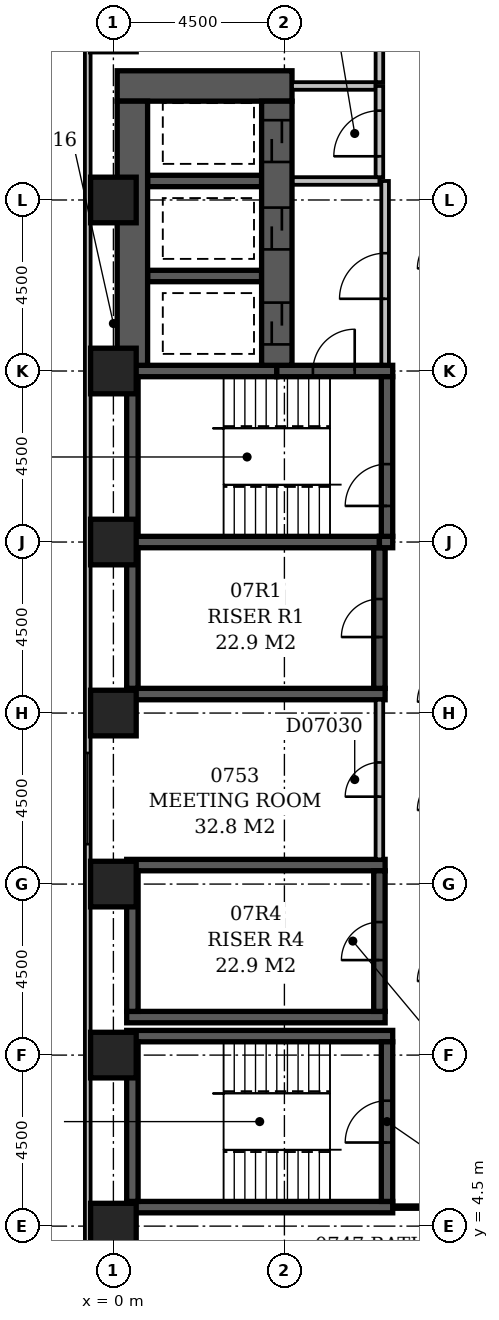
"""IFC4 building model, lengths in metres.
Left out: names, types, materials, properties, quantities, classifications, styles, units other than length and angle.
Written with IfcOpenShell. Run it as: python <this file> out.ifc"""

import sys

from ifc_helpers import new_model, si_unit, direction, frame, frame_2d, origin, origin_2d, place, context, subcontext, project, spatial, rectangle, extrude, element, fill, save


model = new_model("IFC4")
c1 = context("Model", 3, precision=1e-05, world=origin(), true_north=direction((0.0, 1.0)))
c2 = subcontext(c1, "Body", "Model", "MODEL_VIEW")
j1 = project(units=[si_unit("LENGTHUNIT", "METRE"), si_unit("PLANEANGLEUNIT", "RADIAN")], contexts=[c1])
p1 = place(None, origin())
s1 = spatial("IfcSite", under=j1, at=p1, CompositionType="ELEMENT")
p2 = place(p1, origin())
s2 = spatial("IfcBuilding", under=s1, at=p2, CompositionType="ELEMENT")
p3 = place(p2, frame((0.0, 0.0, 36.2)))
s3 = spatial("IfcBuildingStorey", under=s2, at=p3, CompositionType="ELEMENT", Elevation=36.2)
p4 = place(p3, frame((0.1, 34.5, -0.3), z_axis=(0.0, 0.0, 1.0), x_axis=(1.0, 0.0, 0.0)))
e1 = element("IfcWall", 1, at=p4, inside=s3, PredefinedType="SHEAR", context=c2, shape_type="SweptSolid", body=[
    extrude(rectangle(XDim=4.6, YDim=0.8, at=frame_2d((2.3, 0.0))), origin(), (0.0, 0.0, 1.0), 3.6),
])
for number, where, z_axis, x_axis in (
    (2, (0.35, 5.0, -0.3), (0.0, 0.0, 1.0), (1.0, 0.0, 0.0)),
    (3, (0.35, 9.5, -0.3), (0.0, 0.0, 1.0), (1.0, 0.0, 0.0)),
):
    element("IfcWall", number, at=place(p3, frame(where, z_axis=z_axis, x_axis=x_axis)), inside=s3, PredefinedType="SHEAR", context=c2, shape_type="SweptSolid", body=[
        extrude(rectangle(XDim=7.0, YDim=0.3, at=frame_2d((3.5, 0.0))), origin(), (0.0, 0.0, 1.0), 3.6),
    ])
for number, where, z_axis, x_axis in (
    (4, (0.35, 10.0, -0.3), (0.0, 0.0, 1.0), (1.0, 0.0, 0.0)),
    (5, (0.35, 14.0, -0.3), (0.0, 0.0, 1.0), (1.0, 0.0, 0.0)),
    (6, (0.35, 18.5, -0.3), (0.0, 0.0, 1.0), (1.0, 0.0, 0.0)),
):
    element("IfcWall", number, at=place(p3, frame(where, z_axis=z_axis, x_axis=x_axis)), inside=s3, PredefinedType="SHEAR", context=c2, shape_type="SweptSolid", body=[
        extrude(rectangle(XDim=6.8, YDim=0.3, at=frame_2d((3.4, 0.0))), origin(), (0.0, 0.0, 1.0), 3.6),
    ])
p5 = place(p3, frame((0.35, 22.5, -0.3), z_axis=(0.0, 0.0, 1.0), x_axis=(1.0, 0.0, 0.0)))
e7 = element("IfcWall", 7, at=p5, inside=s3, PredefinedType="SHEAR", context=c2, shape_type="SweptSolid", body=[
    extrude(rectangle(XDim=6.65, YDim=0.3, at=frame_2d((3.325, 0.0))), origin(), (0.0, 0.0, 1.0), 3.6),
])
p6 = place(p3, frame((0.35, 27.0, -0.3), z_axis=(0.0, 0.0, 1.0), x_axis=(1.0, 0.0, 0.0)))
e8 = element("IfcWall", 8, at=p6, inside=s3, PredefinedType="SHEAR", context=c2, shape_type="SweptSolid", body=[
    extrude(rectangle(XDim=3.95, YDim=0.3, at=frame_2d((1.975, 0.0))), origin(), (0.0, 0.0, 1.0), 3.6),
])
p7 = place(p3, frame((0.5, 5.15, -0.3), z_axis=(0.0, 0.0, 1.0), x_axis=(0.0, 1.0, 0.0)))
e9 = element("IfcWall", 9, at=p7, inside=s3, PredefinedType="SHEAR", context=c2, shape_type="SweptSolid", body=[
    extrude(rectangle(XDim=4.2, YDim=0.3, at=frame_2d((2.1, 0.0))), origin(), (0.0, 0.0, 1.0), 3.6),
])
for number, where, z_axis, x_axis in (
    (10, (0.5, 10.15, -0.3), (0.0, 0.0, 1.0), (0.0, 1.0, 0.0)),
    (11, (0.5, 18.65, -0.3), (0.0, 0.0, 1.0), (0.0, 1.0, 0.0)),
):
    element("IfcWall", number, at=place(p3, frame(where, z_axis=z_axis, x_axis=x_axis)), inside=s3, PredefinedType="SHEAR", context=c2, shape_type="SweptSolid", body=[
        extrude(rectangle(XDim=3.7, YDim=0.3, at=frame_2d((1.85, 0.0))), origin(), (0.0, 0.0, 1.0), 3.6),
    ])
p8 = place(p3, frame((0.5, 22.65, -0.3), z_axis=(0.0, 0.0, 1.0), x_axis=(0.0, 1.0, 0.0)))
e12 = element("IfcWall", 12, at=p8, inside=s3, PredefinedType="SHEAR", context=c2, shape_type="SweptSolid", body=[
    extrude(rectangle(XDim=4.2, YDim=0.3, at=frame_2d((2.1, 0.0))), origin(), (0.0, 0.0, 1.0), 3.6),
])
p9 = place(p3, frame((0.5, 27.15, -0.3), z_axis=(0.0, 0.0, 1.0), x_axis=(0.0, 1.0, 0.0)))
e13 = element("IfcWall", 13, at=p9, inside=s3, PredefinedType="SHEAR", context=c2, shape_type="SweptSolid", body=[
    extrude(rectangle(XDim=6.95, YDim=0.8, at=frame_2d((3.475, 0.0))), origin(), (0.0, 0.0, 1.0), 3.6),
])
for number, where, z_axis, x_axis in (
    (14, (0.9, 29.5, -0.3), (0.0, 0.0, 1.0), (1.0, 0.0, 0.0)),
    (15, (0.9, 32.0, -0.3), (0.0, 0.0, 1.0), (1.0, 0.0, 0.0)),
):
    element("IfcWall", number, at=place(p3, frame(where, z_axis=z_axis, x_axis=x_axis)), inside=s3, PredefinedType="SHEAR", context=c2, shape_type="SweptSolid", body=[
        extrude(rectangle(XDim=3.0, YDim=0.3, at=frame_2d((1.5, 0.0))), origin(), (0.0, 0.0, 1.0), 3.6),
    ])
p10 = place(p3, frame((4.3, 27.0, -0.3), z_axis=(0.0, 0.0, 1.0), x_axis=(1.0, 0.0, 0.0)))
e16 = element("IfcWall", 16, at=p10, inside=s3, PredefinedType="SHEAR", context=c2, shape_type="SweptSolid", body=[
    extrude(rectangle(XDim=3.05, YDim=0.3, at=frame_2d((1.525, 0.0))), origin(), (0.0, 0.0, 1.0), 3.6),
])
p11 = place(p10, frame((0.95, 0.0, 0.3)))
e17 = element("IfcOpeningElement", 17, at=p11, cuts=e16, PredefinedType="OPENING", context=c2, shape_type="SweptSolid", body=[
    extrude(rectangle(XDim=1.1, YDim=2.1, at=frame_2d((0.55, 1.05))), frame((0.0, 0.162, 0.0), z_axis=(0.0, -1.0, 0.0), x_axis=(1.0, 0.0, 0.0)), (0.0, 0.0, 1.0), 0.324),
])
p12 = place(p3, frame((4.3, 27.15, -0.3), z_axis=(0.0, 0.0, 1.0), x_axis=(0.0, 1.0, 0.0)))
e18 = element("IfcWall", 18, at=p12, inside=s3, PredefinedType="SHEAR", context=c2, shape_type="SweptSolid", body=[
    extrude(rectangle(XDim=6.95, YDim=0.8, at=frame_2d((3.475, 0.0))), origin(), (0.0, 0.0, 1.0), 3.6),
])
p13 = place(p12, frame((3.05, 0.0, 0.3)))
e19 = element("IfcOpeningElement", 19, at=p13, cuts=e18, PredefinedType="OPENING", context=c2, shape_type="SweptSolid", body=[
    extrude(rectangle(XDim=1.1, YDim=2.1, at=frame_2d((0.55, 1.05))), frame((0.0, 0.412, 0.0), z_axis=(0.0, -1.0, 0.0), x_axis=(1.0, 0.0, 0.0)), (0.0, 0.0, 1.0), 0.824),
])
p14 = place(p12, frame((0.55, 0.0, 0.3)))
e20 = element("IfcOpeningElement", 20, at=p14, cuts=e18, PredefinedType="OPENING", context=c2, shape_type="SweptSolid", body=[
    extrude(rectangle(XDim=1.1, YDim=2.1, at=frame_2d((0.55, 1.05))), frame((0.0, 0.412, 0.0), z_axis=(0.0, -1.0, 0.0), x_axis=(1.0, 0.0, 0.0)), (0.0, 0.0, 1.0), 0.824),
])
p15 = place(p12, frame((5.35, 0.0, 0.3)))
e21 = element("IfcOpeningElement", 21, at=p15, cuts=e18, PredefinedType="OPENING", context=c2, shape_type="SweptSolid", body=[
    extrude(rectangle(XDim=1.1, YDim=2.1, at=frame_2d((0.55, 1.05))), frame((0.0, 0.412, 0.0), z_axis=(0.0, -1.0, 0.0), x_axis=(1.0, 0.0, 0.0)), (0.0, 0.0, 1.0), 0.824),
])
p16 = place(p3, frame((7.0, 10.15, -0.3), z_axis=(0.0, 0.0, 1.0), x_axis=(0.0, 1.0, 0.0)))
e22 = element("IfcWall", 22, at=p16, inside=s3, PredefinedType="SHEAR", context=c2, shape_type="SweptSolid", body=[
    extrude(rectangle(XDim=3.7, YDim=0.3, at=frame_2d((1.85, 0.0))), origin(), (0.0, 0.0, 1.0), 3.6),
])
p17 = place(p16, frame((1.35, 0.0, 0.3)))
e23 = element("IfcOpeningElement", 23, at=p17, cuts=e22, PredefinedType="OPENING", context=c2, shape_type="SweptSolid", body=[
    extrude(rectangle(XDim=1.0, YDim=2.1, at=frame_2d((0.5, 1.05))), frame((0.0, 0.162, 0.0), z_axis=(0.0, -1.0, 0.0), x_axis=(1.0, 0.0, 0.0)), (0.0, 0.0, 1.0), 0.324),
])
p18 = place(p3, frame((7.0, 18.65, -0.3), z_axis=(0.0, 0.0, 1.0), x_axis=(0.0, 1.0, 0.0)))
e24 = element("IfcWall", 24, at=p18, inside=s3, PredefinedType="SHEAR", context=c2, shape_type="SweptSolid", body=[
    extrude(rectangle(XDim=3.7, YDim=0.3, at=frame_2d((1.85, 0.0))), origin(), (0.0, 0.0, 1.0), 3.6),
])
p19 = place(p18, frame((1.35, 0.0, 0.3)))
e25 = element("IfcOpeningElement", 25, at=p19, cuts=e24, PredefinedType="OPENING", context=c2, shape_type="SweptSolid", body=[
    extrude(rectangle(XDim=1.0, YDim=2.1, at=frame_2d((0.5, 1.05))), frame((0.0, 0.162, 0.0), z_axis=(0.0, -1.0, 0.0), x_axis=(1.0, 0.0, 0.0)), (0.0, 0.0, 1.0), 0.324),
])
p20 = place(p3, frame((7.0, 22.5, -0.3), z_axis=(0.0, 0.0, 1.0), x_axis=(1.0, 0.0, 0.0)))
e26 = element("IfcWall", 26, at=p20, inside=s3, PredefinedType="SHEAR", context=c2, shape_type="SweptSolid", body=[
    extrude(rectangle(XDim=0.35, YDim=0.3, at=frame_2d((0.175, 0.0))), origin(), (0.0, 0.0, 1.0), 3.6),
])
p21 = place(p3, frame((7.2, 5.15, -0.3), z_axis=(0.0, 0.0, 1.0), x_axis=(0.0, 1.0, 0.0)))
e27 = element("IfcWall", 27, at=p21, inside=s3, PredefinedType="SHEAR", context=c2, shape_type="SweptSolid", body=[
    extrude(rectangle(XDim=4.2, YDim=0.3, at=frame_2d((2.1, 0.0))), origin(), (0.0, 0.0, 1.0), 3.6),
])
p22 = place(p21, frame((1.55, 0.0, 0.3)))
e28 = element("IfcOpeningElement", 28, at=p22, cuts=e27, PredefinedType="OPENING", context=c2, shape_type="SweptSolid", body=[
    extrude(rectangle(XDim=1.1, YDim=2.1, at=frame_2d((0.55, 1.05))), frame((0.0, 0.162, 0.0), z_axis=(0.0, -1.0, 0.0), x_axis=(1.0, 0.0, 0.0)), (0.0, 0.0, 1.0), 0.324),
])
p23 = place(p3, frame((7.2, 22.65, -0.3), z_axis=(0.0, 0.0, 1.0), x_axis=(0.0, 1.0, 0.0)))
e29 = element("IfcWall", 29, at=p23, inside=s3, PredefinedType="SHEAR", context=c2, shape_type="SweptSolid", body=[
    extrude(rectangle(XDim=4.2, YDim=0.3, at=frame_2d((2.1, 0.0))), origin(), (0.0, 0.0, 1.0), 3.6),
])
p24 = place(p23, frame((0.8, 0.0, 0.3)))
e30 = element("IfcOpeningElement", 30, at=p24, cuts=e29, PredefinedType="OPENING", context=c2, shape_type="SweptSolid", body=[
    extrude(rectangle(XDim=1.1, YDim=2.1, at=frame_2d((0.55, 1.05))), frame((0.0, 0.162, 0.0), z_axis=(0.0, -1.0, 0.0), x_axis=(1.0, 0.0, 0.0)), (0.0, 0.0, 1.0), 0.324),
])
for number, where, z_axis, x_axis in (
    (31, (0.0, 4.5, -0.3), (0.0, 0.0, 1.0), (1.0, 0.0, 0.0)),
    (32, (0.0, 9.0, -0.3), (0.0, 0.0, 1.0), (1.0, 0.0, 0.0)),
    (33, (0.0, 13.5, -0.3), (0.0, 0.0, 1.0), (1.0, 0.0, 0.0)),
    (34, (0.0, 18.0, -0.3), (0.0, 0.0, 1.0), (1.0, 0.0, 0.0)),
    (35, (0.0, 22.5, -0.3), (0.0, 0.0, 1.0), (1.0, 0.0, 0.0)),
    (36, (0.0, 27.0, -0.3), (0.0, 0.0, 1.0), (1.0, 0.0, 0.0)),
    (37, (0.0, 31.5, -0.3), (0.0, 0.0, 1.0), (1.0, 0.0, 0.0)),
):
    element("IfcColumn", number, at=place(p3, frame(where, z_axis=z_axis, x_axis=x_axis)), inside=s3, PredefinedType="COLUMN", context=c2, shape_type="SweptSolid", body=[
        extrude(rectangle(XDim=1.2, YDim=1.2, at=origin_2d()), origin(), (0.0, 0.0, 1.0), 3.6),
    ])
p25 = place(p3, frame((-0.675, 59.1, 0.0), z_axis=(0.0, 0.0, 1.0), x_axis=(0.0, -1.0, 0.0)))
e38 = element("IfcWall", 38, at=p25, inside=s3, PredefinedType="STANDARD", context=c2, shape_type="SweptSolid", body=[
    extrude(rectangle(XDim=55.35, YDim=0.15, at=frame_2d((27.675, 0.0))), origin(), (0.0, 0.0, 1.0), 2.7),
])
p26 = place(p25, frame((10.65, 0.0, 0.6)))
e39 = element("IfcOpeningElement", 39, at=p26, cuts=e38, PredefinedType="OPENING", context=c2, shape_type="SweptSolid", body=[
    extrude(rectangle(XDim=2.4, YDim=1.8, at=frame_2d((1.2, 0.9))), frame((0.0, 0.087, 0.0), z_axis=(0.0, -1.0, 0.0), x_axis=(1.0, 0.0, 0.0)), (0.0, 0.0, 1.0), 0.174),
])
p27 = place(p25, frame((15.15, 0.0, 0.6)))
e40 = element("IfcOpeningElement", 40, at=p27, cuts=e38, PredefinedType="OPENING", context=c2, shape_type="SweptSolid", body=[
    extrude(rectangle(XDim=2.4, YDim=1.8, at=frame_2d((1.2, 0.9))), frame((0.0, 0.087, 0.0), z_axis=(0.0, -1.0, 0.0), x_axis=(1.0, 0.0, 0.0)), (0.0, 0.0, 1.0), 0.174),
])
p28 = place(p25, frame((20.977, 0.0, 0.6)))
e41 = element("IfcOpeningElement", 41, at=p28, cuts=e38, PredefinedType="OPENING", context=c2, shape_type="SweptSolid", body=[
    extrude(rectangle(XDim=1.2, YDim=1.8, at=frame_2d((0.6, 0.9))), frame((0.0, 0.087, 0.0), z_axis=(0.0, -1.0, 0.0), x_axis=(1.0, 0.0, 0.0)), (0.0, 0.0, 1.0), 0.174),
])
p29 = place(p25, frame((42.15, 0.0, 0.6)))
e42 = element("IfcOpeningElement", 42, at=p29, cuts=e38, PredefinedType="OPENING", context=c2, shape_type="SweptSolid", body=[
    extrude(rectangle(XDim=2.4, YDim=1.8, at=frame_2d((1.2, 0.9))), frame((0.0, 0.087, 0.0), z_axis=(0.0, -1.0, 0.0), x_axis=(1.0, 0.0, 0.0)), (0.0, 0.0, 1.0), 0.174),
])
p30 = place(p3, frame((4.72, 32.0, 0.0), z_axis=(0.0, 0.0, 1.0), x_axis=(1.0, 0.0, 0.0)))
e43 = element("IfcWall", 43, at=p30, inside=s3, PredefinedType="PARTITIONING", context=c2, shape_type="SweptSolid", body=[
    extrude(rectangle(XDim=2.28, YDim=0.2, at=frame_2d((1.14, 0.0))), origin(), (0.0, 0.0, 1.0), 3.3),
])
p31 = place(p3, frame((7.0, 32.1, 0.0), z_axis=(0.0, 0.0, 1.0), x_axis=(0.0, 1.0, 0.0)))
e44 = element("IfcWall", 44, at=p31, inside=s3, PredefinedType="PARTITIONING", context=c2, shape_type="SweptSolid", body=[
    extrude(rectangle(XDim=2.4, YDim=0.2, at=frame_2d((1.2, 0.0))), origin(), (0.0, 0.0, 1.0), 3.3),
])
p32 = place(p31, frame((0.55, 0.0, 0.0)))
e45 = element("IfcOpeningElement", 45, at=p32, cuts=e44, PredefinedType="OPENING", context=c2, shape_type="SweptSolid", body=[
    extrude(rectangle(XDim=1.2, YDim=2.1, at=frame_2d((0.6, 1.05))), frame((0.0, 0.112, 0.0), z_axis=(0.0, -1.0, 0.0), x_axis=(1.0, 0.0, 0.0)), (0.0, 0.0, 1.0), 0.224),
])
p33 = place(p3, frame((4.7, 34.5, 0.0), z_axis=(0.0, 0.0, 1.0), x_axis=(1.0, 0.0, 0.0)))
e46 = element("IfcWall", 46, at=p33, inside=s3, PredefinedType="PARTITIONING", context=c2, shape_type="SweptSolid", body=[
    extrude(rectangle(XDim=2.2, YDim=0.2, at=frame_2d((1.1, 0.0))), origin(), (0.0, 0.0, 1.0), 3.3),
])
p34 = place(p3, frame((7.15, 27.17, 0.0), z_axis=(0.0, 0.0, 1.0), x_axis=(0.0, 1.0, 0.0)))
e47 = element("IfcWall", 47, at=p34, inside=s3, PredefinedType="PARTITIONING", context=c2, shape_type="SweptSolid", body=[
    extrude(rectangle(XDim=4.83, YDim=0.2, at=frame_2d((2.415, 0.0))), origin(), (0.0, 0.0, 1.0), 3.3),
])
p35 = place(p34, frame((1.73, 0.0, 0.0)))
e48 = element("IfcOpeningElement", 48, at=p35, cuts=e47, PredefinedType="OPENING", context=c2, shape_type="SweptSolid", body=[
    extrude(rectangle(XDim=1.2, YDim=2.1, at=frame_2d((0.6, 1.05))), frame((0.0, 0.112, 0.0), z_axis=(0.0, -1.0, 0.0), x_axis=(1.0, 0.0, 0.0)), (0.0, 0.0, 1.0), 0.224),
])
p36 = place(p3, frame((0.0, 4.4, 0.0), z_axis=(0.0, 0.0, 1.0), x_axis=(0.0, 1.0, 0.0)))
e49 = element("IfcWall", 49, at=p36, inside=s3, PredefinedType="PARTITIONING", context=c2, shape_type="SweptSolid", body=[
    extrude(rectangle(XDim=0.7, YDim=0.1, at=frame_2d((0.35, 0.0))), origin(), (0.0, 0.0, 1.0), 2.7),
])
p37 = place(p3, frame((7.349, 5.0, 0.0), z_axis=(0.0, 0.0, 1.0), x_axis=(1.0, 0.0, 0.0)))
e50 = element("IfcWall", 50, at=p37, inside=s3, PredefinedType="PARTITIONING", context=c2, shape_type="SweptSolid", body=[
    extrude(rectangle(XDim=1.551, YDim=0.1, at=frame_2d((0.775, 0.0))), origin(), (0.0, 0.0, 1.0), 3.3),
])
p38 = place(p3, frame((7.0, 14.15, 0.0), z_axis=(0.0, 0.0, 1.0), x_axis=(0.0, 1.0, 0.0)))
e51 = element("IfcWall", 51, at=p38, inside=s3, PredefinedType="PARTITIONING", context=c2, shape_type="SweptSolid", body=[
    extrude(rectangle(XDim=4.2, YDim=0.2, at=frame_2d((2.1, 0.0))), origin(), (0.0, 0.0, 1.0), 3.3),
])
p39 = place(p38, frame((1.65, 0.0, 0.0)))
e52 = element("IfcOpeningElement", 52, at=p39, cuts=e51, PredefinedType="OPENING", context=c2, shape_type="SweptSolid", body=[
    extrude(rectangle(XDim=0.9, YDim=2.1, at=frame_2d((0.45, 1.05))), frame((0.0, 0.112, 0.0), z_axis=(0.0, -1.0, 0.0), x_axis=(1.0, 0.0, 0.0)), (0.0, 0.0, 1.0), 0.224),
])
p40 = place(p3, frame((7.0, 34.6, 0.0), z_axis=(0.0, 0.0, 1.0), x_axis=(0.0, 1.0, 0.0)))
e53 = element("IfcWall", 53, at=p40, inside=s3, PredefinedType="PARTITIONING", context=c2, shape_type="SweptSolid", body=[
    extrude(rectangle(XDim=14.8, YDim=0.2, at=frame_2d((7.4, 0.0))), origin(), (0.0, 0.0, 1.0), 3.3),
])
p41 = place(p40, frame((6.95, 0.0, 0.0)))
e54 = element("IfcOpeningElement", 54, at=p41, cuts=e53, PredefinedType="OPENING", context=c2, shape_type="SweptSolid", body=[
    extrude(rectangle(XDim=0.9, YDim=2.1, at=frame_2d((0.45, 1.05))), frame((0.0, 0.112, 0.0), z_axis=(0.0, -1.0, 0.0), x_axis=(1.0, 0.0, 0.0)), (0.0, 0.0, 1.0), 0.224),
])
p42 = place(p29, origin())
e55 = element("IfcWindow", 55, at=p42, inside=s3, PartitioningType="SINGLE_PANEL", PredefinedType="WINDOW", context=c2, shape_type="SweptSolid", body=[
    extrude(rectangle(XDim=2.4, YDim=1.8, at=frame_2d((1.2, 0.9))), frame((0.0, 0.03, 0.0), z_axis=(0.0, -1.0, 0.0), x_axis=(1.0, 0.0, 0.0)), (0.0, 0.0, 1.0), 0.06),
])
fill(e42, e55)
p43 = place(p35, origin())
e56 = element("IfcDoor", 56, at=p43, inside=s3, OperationType="SINGLE_SWING_LEFT", PredefinedType="DOOR", context=c2, shape_type="SweptSolid", body=[
    extrude(rectangle(XDim=1.2, YDim=2.1, at=frame_2d((0.6, 1.05))), frame((0.0, 0.025, 0.0), z_axis=(0.0, -1.0, 0.0), x_axis=(1.0, 0.0, 0.0)), (0.0, 0.0, 1.0), 0.05),
])
fill(e48, e56)
p44 = place(p13, origin())
e57 = element("IfcDoor", 57, at=p44, inside=s3, OperationType="SLIDING_TO_LEFT", PredefinedType="DOOR", context=c2, shape_type="SweptSolid", body=[
    extrude(rectangle(XDim=1.1, YDim=2.1, at=frame_2d((0.55, 1.05))), frame((0.0, 0.025, 0.0), z_axis=(0.0, -1.0, 0.0), x_axis=(1.0, 0.0, 0.0)), (0.0, 0.0, 1.0), 0.05),
])
fill(e19, e57)
p45 = place(p14, origin())
e58 = element("IfcDoor", 58, at=p45, inside=s3, OperationType="SLIDING_TO_LEFT", PredefinedType="DOOR", context=c2, shape_type="SweptSolid", body=[
    extrude(rectangle(XDim=1.1, YDim=2.1, at=frame_2d((0.55, 1.05))), frame((0.0, 0.025, 0.0), z_axis=(0.0, -1.0, 0.0), x_axis=(1.0, 0.0, 0.0)), (0.0, 0.0, 1.0), 0.05),
])
fill(e20, e58)
p46 = place(p32, origin())
e59 = element("IfcDoor", 59, at=p46, inside=s3, OperationType="SINGLE_SWING_LEFT", PredefinedType="DOOR", context=c2, shape_type="SweptSolid", body=[
    extrude(rectangle(XDim=1.2, YDim=2.1, at=frame_2d((0.6, 1.05))), frame((0.0, 0.025, 0.0), z_axis=(0.0, -1.0, 0.0), x_axis=(1.0, 0.0, 0.0)), (0.0, 0.0, 1.0), 0.05),
])
fill(e45, e59)
p47 = place(p15, origin())
e60 = element("IfcDoor", 60, at=p47, inside=s3, OperationType="SLIDING_TO_LEFT", PredefinedType="DOOR", context=c2, shape_type="SweptSolid", body=[
    extrude(rectangle(XDim=1.1, YDim=2.1, at=frame_2d((0.55, 1.05))), frame((0.0, 0.025, 0.0), z_axis=(0.0, -1.0, 0.0), x_axis=(1.0, 0.0, 0.0)), (0.0, 0.0, 1.0), 0.05),
])
fill(e21, e60)
p48 = place(p19, origin())
e61 = element("IfcDoor", 61, at=p48, inside=s3, OperationType="SINGLE_SWING_LEFT", PredefinedType="DOOR", context=c2, shape_type="SweptSolid", body=[
    extrude(rectangle(XDim=1.0, YDim=2.1, at=frame_2d((0.5, 1.05))), frame((0.0, 0.025, 0.0), z_axis=(0.0, -1.0, 0.0), x_axis=(1.0, 0.0, 0.0)), (0.0, 0.0, 1.0), 0.05),
])
fill(e25, e61)
p49 = place(p17, origin())
e62 = element("IfcDoor", 62, at=p49, inside=s3, OperationType="SINGLE_SWING_LEFT", PredefinedType="DOOR", context=c2, shape_type="SweptSolid", body=[
    extrude(rectangle(XDim=1.0, YDim=2.1, at=frame_2d((0.5, 1.05))), frame((0.0, 0.025, 0.0), z_axis=(0.0, -1.0, 0.0), x_axis=(1.0, 0.0, 0.0)), (0.0, 0.0, 1.0), 0.05),
])
fill(e23, e62)
p50 = place(p11, frame((1.1, 0.0, 0.0), z_axis=(0.0, 0.0, 1.0), x_axis=(-1.0, 0.0, 0.0)))
e63 = element("IfcDoor", 63, at=p50, inside=s3, OperationType="SINGLE_SWING_LEFT", PredefinedType="DOOR", context=c2, shape_type="SweptSolid", body=[
    extrude(rectangle(XDim=1.1, YDim=2.1, at=frame_2d((0.55, 1.05))), frame((0.0, 0.025, 0.0), z_axis=(0.0, -1.0, 0.0), x_axis=(1.0, 0.0, 0.0)), (0.0, 0.0, 1.0), 0.05),
])
fill(e17, e63)
p51 = place(p24, origin())
e64 = element("IfcDoor", 64, at=p51, inside=s3, OperationType="SINGLE_SWING_LEFT", PredefinedType="DOOR", context=c2, shape_type="SweptSolid", body=[
    extrude(rectangle(XDim=1.1, YDim=2.1, at=frame_2d((0.55, 1.05))), frame((0.0, 0.025, 0.0), z_axis=(0.0, -1.0, 0.0), x_axis=(1.0, 0.0, 0.0)), (0.0, 0.0, 1.0), 0.05),
])
fill(e30, e64)
p52 = place(p22, origin())
e65 = element("IfcDoor", 65, at=p52, inside=s3, OperationType="SINGLE_SWING_LEFT", PredefinedType="DOOR", context=c2, shape_type="SweptSolid", body=[
    extrude(rectangle(XDim=1.1, YDim=2.1, at=frame_2d((0.55, 1.05))), frame((0.0, 0.025, 0.0), z_axis=(0.0, -1.0, 0.0), x_axis=(1.0, 0.0, 0.0)), (0.0, 0.0, 1.0), 0.05),
])
fill(e28, e65)
p53 = place(p39, origin())
e66 = element("IfcDoor", 66, at=p53, inside=s3, OperationType="SINGLE_SWING_LEFT", PredefinedType="DOOR", context=c2, shape_type="SweptSolid", body=[
    extrude(rectangle(XDim=0.9, YDim=2.1, at=frame_2d((0.45, 1.05))), frame((0.0, 0.025, 0.0), z_axis=(0.0, -1.0, 0.0), x_axis=(1.0, 0.0, 0.0)), (0.0, 0.0, 1.0), 0.05),
])
fill(e52, e66)
save(model, sys.argv[1])
